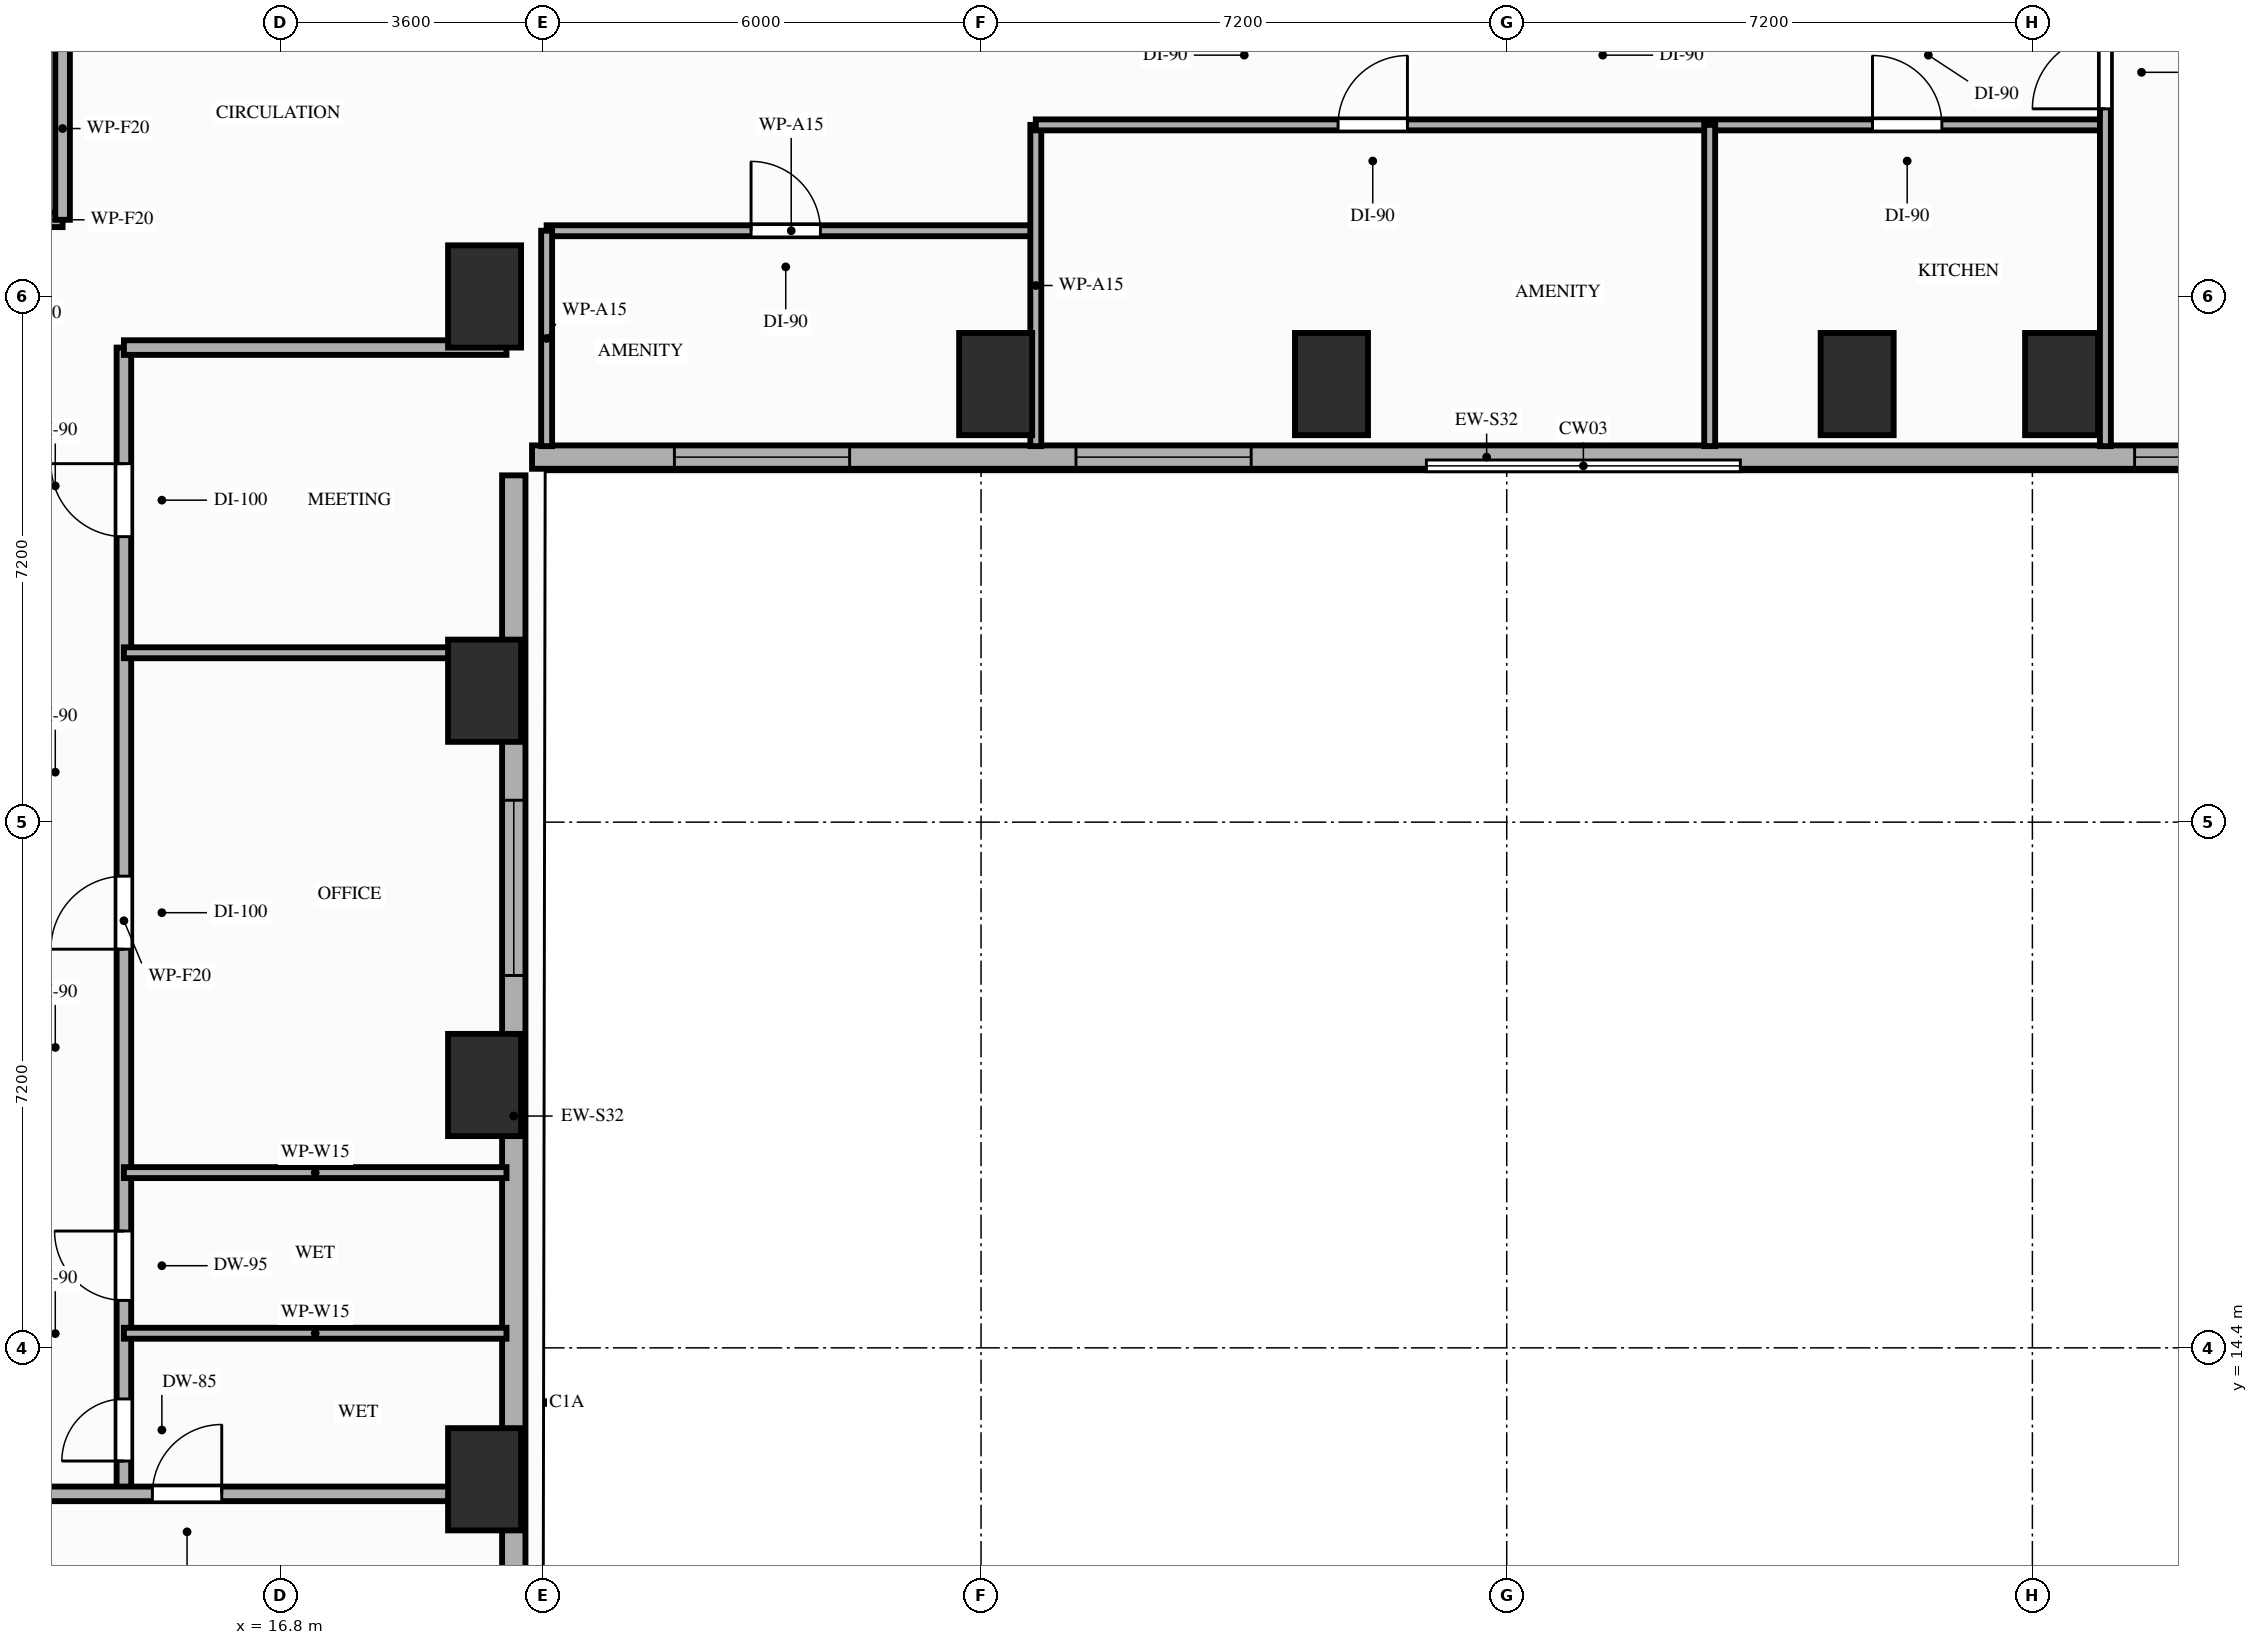
"""IFC4 building model, lengths in metres.
Left out: names, types, materials, properties, quantities, classifications, styles, units other than length and angle.
Written with IfcOpenShell. Run it as: python <this file> out.ifc"""

import sys

from ifc_helpers import new_model, si_unit, direction, frame, frame_2d, origin, origin_2d, place, context, subcontext, project, spatial, rectangle, extrude, element, fill, save


model = new_model("IFC4")
c1 = context("Model", 3, precision=1e-05, world=origin(), true_north=direction((0.0, 1.0)))
c2 = subcontext(c1, "Body", "Model", "MODEL_VIEW")
j1 = project(units=[si_unit("LENGTHUNIT", "METRE"), si_unit("PLANEANGLEUNIT", "RADIAN")], contexts=[c1])
p1 = place(None, origin())
s1 = spatial("IfcSite", under=j1, at=p1, CompositionType="ELEMENT")
p2 = place(p1, origin())
s2 = spatial("IfcBuilding", under=s1, at=p2, CompositionType="ELEMENT")
p3 = place(p2, frame((0.0, 0.0, 43.6)))
s3 = spatial("IfcBuildingStorey", under=s2, at=p3, CompositionType="ELEMENT", Elevation=43.6)
for number, where, z_axis, x_axis in (
    (1, (19.6, 12.6, 0.0), (0.0, 0.0, 1.0), (1.0, 0.0, 0.0)),
    (2, (19.6, 18.0, 0.0), (0.0, 0.0, 1.0), (1.0, 0.0, 0.0)),
    (3, (19.6, 23.4, 0.0), (0.0, 0.0, 1.0), (1.0, 0.0, 0.0)),
    (4, (19.6, 28.8, 0.0), (0.0, 0.0, 1.0), (1.0, 0.0, 0.0)),
    (5, (26.6, 27.6, 0.0), (0.0, 0.0, 1.0), (1.0, 0.0, 0.0)),
    (6, (31.2, 27.6, 0.0), (0.0, 0.0, 1.0), (1.0, 0.0, 0.0)),
    (7, (38.4, 27.6, 0.0), (0.0, 0.0, 1.0), (1.0, 0.0, 0.0)),
    (8, (41.2, 27.6, 0.0), (0.0, 0.0, 1.0), (1.0, 0.0, 0.0)),
):
    element("IfcColumn", number, at=place(p3, frame(where, z_axis=z_axis, x_axis=x_axis)), inside=s3, PredefinedType="COLUMN", context=c2, shape_type="SweptSolid", body=[
        extrude(rectangle(XDim=1.0, YDim=1.4, at=origin_2d()), origin(), (0.0, 0.0, 1.0), 3.2),
    ])
p4 = place(p3, frame((20.0, 8.8, 0.0), z_axis=(0.0, 0.0, 1.0), x_axis=(0.0, 1.0, 0.0)))
e9 = element("IfcWall", 9, at=p4, inside=s3, PredefinedType="STANDARD", context=c2, shape_type="SweptSolid", body=[
    extrude(rectangle(XDim=17.55, YDim=0.32, at=frame_2d((8.775, 0.0))), origin(), (0.0, 0.0, 1.0), 2.41),
])
p5 = place(p4, frame((10.7, 0.0, 0.85)))
e10 = element("IfcOpeningElement", 10, at=p5, cuts=e9, PredefinedType="OPENING", context=c2, shape_type="SweptSolid", body=[
    extrude(rectangle(XDim=2.4, YDim=1.31, at=frame_2d((1.2, 0.655))), frame((0.0, 0.17, 0.0), z_axis=(0.0, -1.0, 0.0), x_axis=(1.0, 0.0, 0.0)), (0.0, 0.0, 1.0), 0.34),
])
p6 = place(p3, frame((20.25, 26.6, 0.0), z_axis=(0.0, 0.0, 1.0), x_axis=(1.0, 0.0, 0.0)))
e11 = element("IfcWall", 11, at=p6, inside=s3, PredefinedType="STANDARD", context=c2, shape_type="SweptSolid", body=[
    extrude(rectangle(XDim=26.15, YDim=0.32, at=frame_2d((13.075, 0.0))), origin(), (0.0, 0.0, 1.0), 2.7),
])
p7 = place(p6, frame((1.95, 0.0, 0.85)))
e12 = element("IfcOpeningElement", 12, at=p7, cuts=e11, PredefinedType="OPENING", context=c2, shape_type="SweptSolid", body=[
    extrude(rectangle(XDim=2.4, YDim=1.6, at=frame_2d((1.2, 0.8))), frame((0.0, 0.17, 0.0), z_axis=(0.0, -1.0, 0.0), x_axis=(1.0, 0.0, 0.0)), (0.0, 0.0, 1.0), 0.34),
])
p8 = place(p6, frame((7.45, 0.0, 0.85)))
e13 = element("IfcOpeningElement", 13, at=p8, cuts=e11, PredefinedType="OPENING", context=c2, shape_type="SweptSolid", body=[
    extrude(rectangle(XDim=2.4, YDim=1.6, at=frame_2d((1.2, 0.8))), frame((0.0, 0.17, 0.0), z_axis=(0.0, -1.0, 0.0), x_axis=(1.0, 0.0, 0.0)), (0.0, 0.0, 1.0), 0.34),
])
p9 = place(p6, frame((21.95, 0.0, 0.85)))
e14 = element("IfcOpeningElement", 14, at=p9, cuts=e11, PredefinedType="OPENING", context=c2, shape_type="SweptSolid", body=[
    extrude(rectangle(XDim=2.4, YDim=1.6, at=frame_2d((1.2, 0.8))), frame((0.0, 0.17, 0.0), z_axis=(0.0, -1.0, 0.0), x_axis=(1.0, 0.0, 0.0)), (0.0, 0.0, 1.0), 0.34),
])
p10 = place(p3, frame((12.55, 29.85, 0.0), z_axis=(0.0, 0.0, 1.0), x_axis=(1.0, 0.0, 0.0)))
e15 = element("IfcWall", 15, at=p10, inside=s3, PredefinedType="PARTITIONING", context=c2, shape_type="SweptSolid", body=[
    extrude(rectangle(XDim=1.27, YDim=0.2, at=frame_2d((0.635, 0.0))), origin(), (0.0, 0.0, 1.0), 3.02),
])
p11 = place(p10, frame((0.21, 0.0, 0.0)))
e16 = element("IfcOpeningElement", 16, at=p11, cuts=e15, PredefinedType="OPENING", context=c2, shape_type="SweptSolid", body=[
    extrude(rectangle(XDim=0.85, YDim=2.05, at=frame_2d((0.425, 1.025))), frame((0.0, 0.11, 0.0), z_axis=(0.0, -1.0, 0.0), x_axis=(1.0, 0.0, 0.0)), (0.0, 0.0, 1.0), 0.22),
])
p12 = place(p3, frame((13.82, 29.85, 0.0), z_axis=(0.0, 0.0, 1.0), x_axis=(0.0, 1.0, 0.0)))
e17 = element("IfcWall", 17, at=p12, inside=s3, PredefinedType="PARTITIONING", context=c2, shape_type="SweptSolid", body=[
    extrude(rectangle(XDim=2.5, YDim=0.2, at=frame_2d((1.25, 0.0))), origin(), (0.0, 0.0, 1.0), 3.02),
])
p13 = place(p3, frame((14.66, 12.4, 0.0), z_axis=(0.0, 0.0, 1.0), x_axis=(0.0, 1.0, 0.0)))
e18 = element("IfcWall", 18, at=p13, inside=s3, PredefinedType="PARTITIONING", context=c2, shape_type="SweptSolid", body=[
    extrude(rectangle(XDim=15.7, YDim=0.2, at=frame_2d((7.85, 0.0))), origin(), (0.0, 0.0, 1.0), 2.41),
])
p14 = place(p13, frame((0.45, 0.0, 0.0)))
e19 = element("IfcOpeningElement", 19, at=p14, cuts=e18, PredefinedType="OPENING", context=c2, shape_type="SweptSolid", body=[
    extrude(rectangle(XDim=0.85, YDim=2.1, at=frame_2d((0.425, 1.05))), frame((0.0, 0.11, 0.0), z_axis=(0.0, -1.0, 0.0), x_axis=(1.0, 0.0, 0.0)), (0.0, 0.0, 1.0), 0.22),
])
p15 = place(p13, frame((2.65, 0.0, 0.0)))
e20 = element("IfcOpeningElement", 20, at=p15, cuts=e18, PredefinedType="OPENING", context=c2, shape_type="SweptSolid", body=[
    extrude(rectangle(XDim=0.95, YDim=2.1, at=frame_2d((0.475, 1.05))), frame((0.0, 0.11, 0.0), z_axis=(0.0, -1.0, 0.0), x_axis=(1.0, 0.0, 0.0)), (0.0, 0.0, 1.0), 0.22),
])
p16 = place(p13, frame((7.46, 0.0, 0.0)))
e21 = element("IfcOpeningElement", 21, at=p16, cuts=e18, PredefinedType="OPENING", context=c2, shape_type="SweptSolid", body=[
    extrude(rectangle(XDim=1.0, YDim=2.15, at=frame_2d((0.5, 1.075))), frame((0.0, 0.11, 0.0), z_axis=(0.0, -1.0, 0.0), x_axis=(1.0, 0.0, 0.0)), (0.0, 0.0, 1.0), 0.22),
])
p17 = place(p13, frame((13.11, 0.0, 0.0)))
e22 = element("IfcOpeningElement", 22, at=p17, cuts=e18, PredefinedType="OPENING", context=c2, shape_type="SweptSolid", body=[
    extrude(rectangle(XDim=1.0, YDim=2.15, at=frame_2d((0.5, 1.075))), frame((0.0, 0.11, 0.0), z_axis=(0.0, -1.0, 0.0), x_axis=(1.0, 0.0, 0.0)), (0.0, 0.0, 1.0), 0.22),
])
p18 = place(p3, frame((3.9, 12.4, 0.0), z_axis=(0.0, 0.0, 1.0), x_axis=(1.0, 0.0, 0.0)))
e23 = element("IfcWall", 23, at=p18, inside=s3, PredefinedType="PARTITIONING", context=c2, shape_type="SweptSolid", body=[
    extrude(rectangle(XDim=16.0, YDim=0.2, at=frame_2d((8.0, 0.0))), origin(), (0.0, 0.0, 1.0), 2.41),
])
p19 = place(p18, frame((11.15, 0.0, 0.0)))
e24 = element("IfcOpeningElement", 24, at=p19, cuts=e23, PredefinedType="OPENING", context=c2, shape_type="SweptSolid", body=[
    extrude(rectangle(XDim=0.95, YDim=2.15, at=frame_2d((0.475, 1.075))), frame((0.0, 0.11, 0.0), z_axis=(0.0, -1.0, 0.0), x_axis=(1.0, 0.0, 0.0)), (0.0, 0.0, 1.0), 0.22),
])
p20 = place(p3, frame((14.66, 28.1, 0.0), z_axis=(0.0, 0.0, 1.0), x_axis=(1.0, 0.0, 0.0)))
e25 = element("IfcWall", 25, at=p20, inside=s3, PredefinedType="PARTITIONING", context=c2, shape_type="SweptSolid", body=[
    extrude(rectangle(XDim=5.24, YDim=0.2, at=frame_2d((2.62, 0.0))), origin(), (0.0, 0.0, 1.0), 2.41),
])
p21 = place(p3, frame((20.45, 29.7, 0.0), z_axis=(0.0, 0.0, 1.0), x_axis=(1.0, 0.0, 0.0)))
e26 = element("IfcWall", 26, at=p21, inside=s3, PredefinedType="PARTITIONING", context=c2, shape_type="SweptSolid", body=[
    extrude(rectangle(XDim=6.7, YDim=0.15, at=frame_2d((3.35, 0.0))), origin(), (0.0, 0.0, 1.0), 3.02),
])
p22 = place(p21, frame((2.8, 0.0, 0.0)))
e27 = element("IfcOpeningElement", 27, at=p22, cuts=e26, PredefinedType="OPENING", context=c2, shape_type="SweptSolid", body=[
    extrude(rectangle(XDim=0.95, YDim=2.15, at=frame_2d((0.475, 1.075))), frame((0.0, 0.085, 0.0), z_axis=(0.0, -1.0, 0.0), x_axis=(1.0, 0.0, 0.0)), (0.0, 0.0, 1.0), 0.17),
])
p23 = place(p3, frame((20.45, 26.75, 0.0), z_axis=(0.0, 0.0, 1.0), x_axis=(0.0, 1.0, 0.0)))
e28 = element("IfcWall", 28, at=p23, inside=s3, PredefinedType="PARTITIONING", context=c2, shape_type="SweptSolid", body=[
    extrude(rectangle(XDim=2.95, YDim=0.15, at=frame_2d((1.475, 0.0))), origin(), (0.0, 0.0, 1.0), 2.41),
])
p24 = place(p3, frame((27.15, 26.75, 0.0), z_axis=(0.0, 0.0, 1.0), x_axis=(0.0, 1.0, 0.0)))
e29 = element("IfcWall", 29, at=p24, inside=s3, PredefinedType="PARTITIONING", context=c2, shape_type="SweptSolid", body=[
    extrude(rectangle(XDim=4.4, YDim=0.15, at=frame_2d((2.2, 0.0))), origin(), (0.0, 0.0, 1.0), 2.41),
])
for number, where, z_axis, x_axis in (
    (30, (14.66, 14.6, 0.0), (0.0, 0.0, 1.0), (1.0, 0.0, 0.0)),
    (31, (14.66, 16.8, 0.0), (0.0, 0.0, 1.0), (1.0, 0.0, 0.0)),
    (32, (14.66, 23.92, 0.0), (0.0, 0.0, 1.0), (1.0, 0.0, 0.0)),
):
    element("IfcWall", number, at=place(p3, frame(where, z_axis=z_axis, x_axis=x_axis)), inside=s3, PredefinedType="PARTITIONING", context=c2, shape_type="SweptSolid", body=[
        extrude(rectangle(XDim=5.24, YDim=0.15, at=frame_2d((2.62, 0.0))), origin(), (0.0, 0.0, 1.0), 2.41),
    ])
p25 = place(p3, frame((27.15, 31.15, 0.0), z_axis=(0.0, 0.0, 1.0), x_axis=(1.0, 0.0, 0.0)))
e33 = element("IfcWall", 33, at=p25, inside=s3, PredefinedType="PARTITIONING", context=c2, shape_type="SweptSolid", body=[
    extrude(rectangle(XDim=14.65, YDim=0.15, at=frame_2d((7.325, 0.0))), origin(), (0.0, 0.0, 1.0), 2.41),
])
p26 = place(p25, frame((4.14, 0.0, 0.0)))
e34 = element("IfcOpeningElement", 34, at=p26, cuts=e33, PredefinedType="OPENING", context=c2, shape_type="SweptSolid", body=[
    extrude(rectangle(XDim=0.95, YDim=2.15, at=frame_2d((0.475, 1.075))), frame((0.0, 0.085, 0.0), z_axis=(0.0, -1.0, 0.0), x_axis=(1.0, 0.0, 0.0)), (0.0, 0.0, 1.0), 0.17),
])
p27 = place(p25, frame((11.46, 0.0, 0.0)))
e35 = element("IfcOpeningElement", 35, at=p27, cuts=e33, PredefinedType="OPENING", context=c2, shape_type="SweptSolid", body=[
    extrude(rectangle(XDim=0.95, YDim=2.15, at=frame_2d((0.475, 1.075))), frame((0.0, 0.085, 0.0), z_axis=(0.0, -1.0, 0.0), x_axis=(1.0, 0.0, 0.0)), (0.0, 0.0, 1.0), 0.17),
])
p28 = place(p3, frame((41.8, 26.75, 0.0), z_axis=(0.0, 0.0, 1.0), x_axis=(0.0, 1.0, 0.0)))
e36 = element("IfcWall", 36, at=p28, inside=s3, PredefinedType="PARTITIONING", context=c2, shape_type="SweptSolid", body=[
    extrude(rectangle(XDim=15.45, YDim=0.15, at=frame_2d((7.725, 0.0))), origin(), (0.0, 0.0, 1.0), 2.41),
])
p29 = place(p28, frame((4.62, 0.0, 0.0)))
e37 = element("IfcOpeningElement", 37, at=p29, cuts=e36, PredefinedType="OPENING", context=c2, shape_type="SweptSolid", body=[
    extrude(rectangle(XDim=1.0, YDim=2.15, at=frame_2d((0.5, 1.075))), frame((0.0, 0.085, 0.0), z_axis=(0.0, -1.0, 0.0), x_axis=(1.0, 0.0, 0.0)), (0.0, 0.0, 1.0), 0.17),
])
p30 = place(p3, frame((36.38, 26.75, 0.0), z_axis=(0.0, 0.0, 1.0), x_axis=(0.0, 1.0, 0.0)))
e38 = element("IfcWall", 38, at=p30, inside=s3, PredefinedType="PARTITIONING", context=c2, shape_type="SweptSolid", body=[
    extrude(rectangle(XDim=4.4, YDim=0.15, at=frame_2d((2.2, 0.0))), origin(), (0.0, 0.0, 1.0), 2.41),
])
p31 = place(p5, origin())
e39 = element("IfcWindow", 39, at=p31, inside=s3, PartitioningType="SINGLE_PANEL", PredefinedType="WINDOW", context=c2, shape_type="SweptSolid", body=[
    extrude(rectangle(XDim=2.4, YDim=1.31, at=frame_2d((1.2, 0.655))), frame((0.0, 0.03, 0.0), z_axis=(0.0, -1.0, 0.0), x_axis=(1.0, 0.0, 0.0)), (0.0, 0.0, 1.0), 0.06),
])
fill(e10, e39)
p32 = place(p7, origin())
e40 = element("IfcWindow", 40, at=p32, inside=s3, PartitioningType="SINGLE_PANEL", PredefinedType="WINDOW", context=c2, shape_type="SweptSolid", body=[
    extrude(rectangle(XDim=2.4, YDim=1.6, at=frame_2d((1.2, 0.8))), frame((0.0, 0.03, 0.0), z_axis=(0.0, -1.0, 0.0), x_axis=(1.0, 0.0, 0.0)), (0.0, 0.0, 1.0), 0.06),
])
fill(e12, e40)
p33 = place(p8, origin())
e41 = element("IfcWindow", 41, at=p33, inside=s3, PartitioningType="SINGLE_PANEL", PredefinedType="WINDOW", context=c2, shape_type="SweptSolid", body=[
    extrude(rectangle(XDim=2.4, YDim=1.6, at=frame_2d((1.2, 0.8))), frame((0.0, 0.03, 0.0), z_axis=(0.0, -1.0, 0.0), x_axis=(1.0, 0.0, 0.0)), (0.0, 0.0, 1.0), 0.06),
])
fill(e13, e41)
p34 = place(p9, origin())
e42 = element("IfcWindow", 42, at=p34, inside=s3, PartitioningType="SINGLE_PANEL", PredefinedType="WINDOW", context=c2, shape_type="SweptSolid", body=[
    extrude(rectangle(XDim=2.4, YDim=1.6, at=frame_2d((1.2, 0.8))), frame((0.0, 0.03, 0.0), z_axis=(0.0, -1.0, 0.0), x_axis=(1.0, 0.0, 0.0)), (0.0, 0.0, 1.0), 0.06),
])
fill(e14, e42)
p35 = place(p22, origin())
e43 = element("IfcDoor", 43, at=p35, inside=s3, OperationType="SINGLE_SWING_LEFT", PredefinedType="DOOR", context=c2, shape_type="SweptSolid", body=[
    extrude(rectangle(XDim=0.95, YDim=2.15, at=frame_2d((0.475, 1.075))), frame((0.0, 0.025, 0.0), z_axis=(0.0, -1.0, 0.0), x_axis=(1.0, 0.0, 0.0)), (0.0, 0.0, 1.0), 0.05),
])
fill(e27, e43)
p36 = place(p19, origin())
e44 = element("IfcDoor", 44, at=p36, inside=s3, OperationType="SINGLE_SWING_RIGHT", PredefinedType="DOOR", context=c2, shape_type="SweptSolid", body=[
    extrude(rectangle(XDim=0.95, YDim=2.15, at=frame_2d((0.475, 1.075))), frame((0.0, 0.025, 0.0), z_axis=(0.0, -1.0, 0.0), x_axis=(1.0, 0.0, 0.0)), (0.0, 0.0, 1.0), 0.05),
])
fill(e24, e44)
p37 = place(p14, origin())
e45 = element("IfcDoor", 45, at=p37, inside=s3, OperationType="SINGLE_SWING_LEFT", PredefinedType="DOOR", context=c2, shape_type="SweptSolid", body=[
    extrude(rectangle(XDim=0.85, YDim=2.1, at=frame_2d((0.425, 1.05))), frame((0.0, 0.025, 0.0), z_axis=(0.0, -1.0, 0.0), x_axis=(1.0, 0.0, 0.0)), (0.0, 0.0, 1.0), 0.05),
])
fill(e19, e45)
p38 = place(p15, origin())
e46 = element("IfcDoor", 46, at=p38, inside=s3, OperationType="SINGLE_SWING_RIGHT", PredefinedType="DOOR", context=c2, shape_type="SweptSolid", body=[
    extrude(rectangle(XDim=0.95, YDim=2.1, at=frame_2d((0.475, 1.05))), frame((0.0, 0.025, 0.0), z_axis=(0.0, -1.0, 0.0), x_axis=(1.0, 0.0, 0.0)), (0.0, 0.0, 1.0), 0.05),
])
fill(e20, e46)
p39 = place(p16, origin())
e47 = element("IfcDoor", 47, at=p39, inside=s3, OperationType="SINGLE_SWING_LEFT", PredefinedType="DOOR", context=c2, shape_type="SweptSolid", body=[
    extrude(rectangle(XDim=1.0, YDim=2.15, at=frame_2d((0.5, 1.075))), frame((0.0, 0.025, 0.0), z_axis=(0.0, -1.0, 0.0), x_axis=(1.0, 0.0, 0.0)), (0.0, 0.0, 1.0), 0.05),
])
fill(e21, e47)
p40 = place(p17, origin())
e48 = element("IfcDoor", 48, at=p40, inside=s3, OperationType="SINGLE_SWING_RIGHT", PredefinedType="DOOR", context=c2, shape_type="SweptSolid", body=[
    extrude(rectangle(XDim=1.0, YDim=2.15, at=frame_2d((0.5, 1.075))), frame((0.0, 0.025, 0.0), z_axis=(0.0, -1.0, 0.0), x_axis=(1.0, 0.0, 0.0)), (0.0, 0.0, 1.0), 0.05),
])
fill(e22, e48)
p41 = place(p29, origin())
e49 = element("IfcDoor", 49, at=p41, inside=s3, OperationType="SINGLE_SWING_LEFT", PredefinedType="DOOR", context=c2, shape_type="SweptSolid", body=[
    extrude(rectangle(XDim=1.0, YDim=2.15, at=frame_2d((0.5, 1.075))), frame((0.0, 0.025, 0.0), z_axis=(0.0, -1.0, 0.0), x_axis=(1.0, 0.0, 0.0)), (0.0, 0.0, 1.0), 0.05),
])
fill(e37, e49)
p42 = place(p26, origin())
e50 = element("IfcDoor", 50, at=p42, inside=s3, OperationType="SINGLE_SWING_RIGHT", PredefinedType="DOOR", context=c2, shape_type="SweptSolid", body=[
    extrude(rectangle(XDim=0.95, YDim=2.15, at=frame_2d((0.475, 1.075))), frame((0.0, 0.025, 0.0), z_axis=(0.0, -1.0, 0.0), x_axis=(1.0, 0.0, 0.0)), (0.0, 0.0, 1.0), 0.05),
])
fill(e34, e50)
p43 = place(p27, origin())
e51 = element("IfcDoor", 51, at=p43, inside=s3, OperationType="SINGLE_SWING_LEFT", PredefinedType="DOOR", context=c2, shape_type="SweptSolid", body=[
    extrude(rectangle(XDim=0.95, YDim=2.15, at=frame_2d((0.475, 1.075))), frame((0.0, 0.025, 0.0), z_axis=(0.0, -1.0, 0.0), x_axis=(1.0, 0.0, 0.0)), (0.0, 0.0, 1.0), 0.05),
])
fill(e35, e51)
save(model, sys.argv[1])
